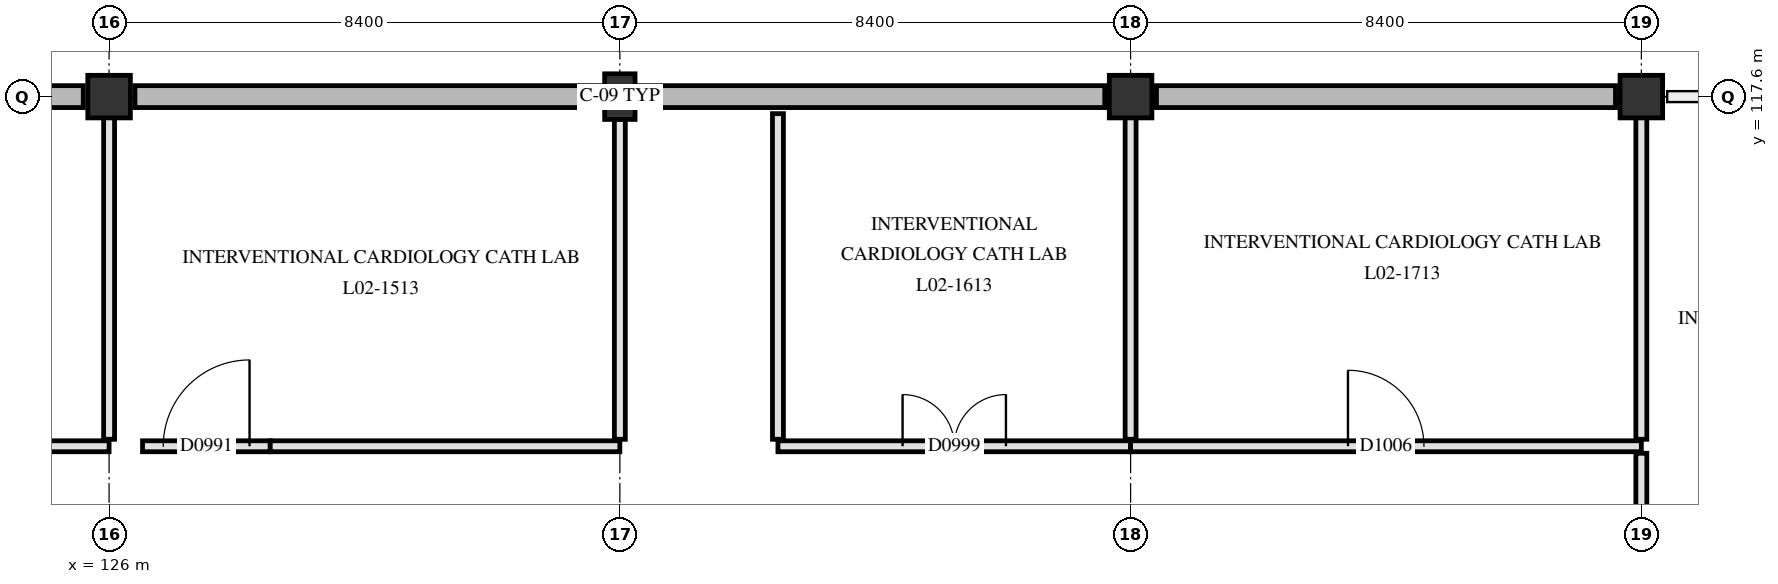
"""IFC4 building model, lengths in metres.
Left out: names, types, materials, properties, quantities, classifications, styles, units other than length and angle.
Written with IfcOpenShell. Run it as: python <this file> out.ifc"""

import sys

from ifc_helpers import new_model, si_unit, direction, frame, frame_2d, origin, origin_2d, place, context, subcontext, project, spatial, rectangle, extrude, element, fill, save


model = new_model("IFC4")
c1 = context("Model", 3, precision=1e-05, world=origin(), true_north=direction((0.0, 1.0)))
c2 = subcontext(c1, "Body", "Model", "MODEL_VIEW")
j1 = project(units=[si_unit("LENGTHUNIT", "METRE"), si_unit("PLANEANGLEUNIT", "RADIAN")], contexts=[c1])
p1 = place(None, origin())
s1 = spatial("IfcSite", under=j1, at=p1, CompositionType="ELEMENT")
p2 = place(p1, origin())
s2 = spatial("IfcBuilding", under=s1, at=p2, CompositionType="ELEMENT")
p3 = place(p2, frame((0.0, 0.0, 9.3)))
s3 = spatial("IfcBuildingStorey", under=s2, at=p3, CompositionType="ELEMENT", Elevation=9.3)
p4 = place(p3, frame((126.0, 117.6, 0.0), z_axis=(0.0, 0.0, 1.0), x_axis=(1.0, 0.0, 0.0)))
e1 = element("IfcColumn", 1, at=p4, inside=s3, PredefinedType="COLUMN", context=c2, shape_type="SweptSolid", body=[
    extrude(rectangle(XDim=0.7, YDim=0.7, at=origin_2d()), origin(), (0.0, 0.0, 1.0), 5.1),
])
p5 = place(p3, frame((134.4, 117.6, 0.0), z_axis=(0.0, 0.0, 1.0), x_axis=(1.0, 0.0, 0.0)))
e2 = element("IfcColumn", 2, at=p5, inside=s3, PredefinedType="PILASTER", context=c2, shape_type="SweptSolid", body=[
    extrude(rectangle(XDim=0.5, YDim=0.75, at=origin_2d()), origin(), (0.0, 0.0, 1.0), 5.1),
])
for number, where, z_axis, x_axis in (
    (3, (142.8, 117.6, 0.0), (0.0, 0.0, 1.0), (1.0, 0.0, 0.0)),
    (4, (151.2, 117.6, 0.0), (0.0, 0.0, 1.0), (1.0, 0.0, 0.0)),
):
    element("IfcColumn", number, at=place(p3, frame(where, z_axis=z_axis, x_axis=x_axis)), inside=s3, PredefinedType="COLUMN", context=c2, shape_type="SweptSolid", body=[
        extrude(rectangle(XDim=0.7, YDim=0.7, at=origin_2d()), origin(), (0.0, 0.0, 1.0), 5.1),
    ])
p6 = place(p3, frame((118.025, 117.6, 0.0), z_axis=(0.0, 0.0, 1.0), x_axis=(1.0, 0.0, 0.0)))
e5 = element("IfcWall", 5, at=p6, inside=s3, PredefinedType="SOLIDWALL", context=c2, shape_type="SweptSolid", body=[
    extrude(rectangle(XDim=7.55, YDim=0.36, at=frame_2d((3.775, 0.0))), origin(), (0.0, 0.0, 1.0), 4.78),
])
for number, where, z_axis, x_axis in (
    (6, (126.425, 117.6, 0.0), (0.0, 0.0, 1.0), (1.0, 0.0, 0.0)),
    (7, (134.725, 117.6, 0.0), (0.0, 0.0, 1.0), (1.0, 0.0, 0.0)),
):
    element("IfcWall", number, at=place(p3, frame(where, z_axis=z_axis, x_axis=x_axis)), inside=s3, PredefinedType="SOLIDWALL", context=c2, shape_type="SweptSolid", body=[
        extrude(rectangle(XDim=7.65, YDim=0.36, at=frame_2d((3.825, 0.0))), origin(), (0.0, 0.0, 1.0), 4.78),
    ])
p7 = place(p3, frame((143.225, 117.6, 0.0), z_axis=(0.0, 0.0, 1.0), x_axis=(1.0, 0.0, 0.0)))
e8 = element("IfcWall", 8, at=p7, inside=s3, PredefinedType="SOLIDWALL", context=c2, shape_type="SweptSolid", body=[
    extrude(rectangle(XDim=7.55, YDim=0.36, at=frame_2d((3.775, 0.0))), origin(), (0.0, 0.0, 1.0), 4.78),
])
p8 = place(p3, frame((117.6, 111.85, 0.0), z_axis=(0.0, 0.0, 1.0), x_axis=(1.0, 0.0, 0.0)))
e9 = element("IfcWall", 9, at=p8, inside=s3, PredefinedType="PARTITIONING", context=c2, shape_type="SweptSolid", body=[
    extrude(rectangle(XDim=8.4, YDim=0.18, at=frame_2d((4.2, 0.0))), origin(), (0.0, 0.0, 1.0), 4.17),
])
p9 = place(p8, frame((3.28, 0.0, 0.0)))
e10 = element("IfcOpeningElement", 10, at=p9, cuts=e9, PredefinedType="OPENING", context=c2, shape_type="SweptSolid", body=[
    extrude(rectangle(XDim=1.84, YDim=2.28, at=frame_2d((0.92, 1.14))), frame((0.0, 0.1, 0.0), z_axis=(0.0, -1.0, 0.0), x_axis=(1.0, 0.0, 0.0)), (0.0, 0.0, 1.0), 0.2),
])
p10 = place(p3, frame((126.55, 111.85, 0.0), z_axis=(0.0, 0.0, 1.0), x_axis=(1.0, 0.0, 0.0)))
e11 = element("IfcWall", 11, at=p10, inside=s3, PredefinedType="PARTITIONING", context=c2, shape_type="SweptSolid", body=[
    extrude(rectangle(XDim=2.1, YDim=0.18, at=frame_2d((1.05, 0.0))), origin(), (0.0, 0.0, 1.0), 4.77),
])
p11 = place(p10, frame((0.34, 0.0, 0.0)))
e12 = element("IfcOpeningElement", 12, at=p11, cuts=e11, PredefinedType="OPENING", context=c2, shape_type="SweptSolid", body=[
    extrude(rectangle(XDim=1.42, YDim=2.22, at=frame_2d((0.71, 1.11))), frame((0.0, 0.1, 0.0), z_axis=(0.0, -1.0, 0.0), x_axis=(1.0, 0.0, 0.0)), (0.0, 0.0, 1.0), 0.2),
])
p12 = place(p3, frame((128.65, 111.85, 0.0), z_axis=(0.0, 0.0, 1.0), x_axis=(1.0, 0.0, 0.0)))
e13 = element("IfcWall", 13, at=p12, inside=s3, PredefinedType="PARTITIONING", context=c2, shape_type="SweptSolid", body=[
    extrude(rectangle(XDim=5.75, YDim=0.18, at=frame_2d((2.875, 0.0))), origin(), (0.0, 0.0, 1.0), 4.17),
])
p13 = place(p3, frame((137.0, 111.85, 0.0), z_axis=(0.0, 0.0, 1.0), x_axis=(1.0, 0.0, 0.0)))
e14 = element("IfcWall", 14, at=p13, inside=s3, PredefinedType="PARTITIONING", context=c2, shape_type="SweptSolid", body=[
    extrude(rectangle(XDim=5.8, YDim=0.18, at=frame_2d((2.9, 0.0))), origin(), (0.0, 0.0, 1.0), 4.17),
])
p14 = place(p13, frame((2.05, 0.0, 0.0)))
e15 = element("IfcOpeningElement", 15, at=p14, cuts=e14, PredefinedType="OPENING", context=c2, shape_type="SweptSolid", body=[
    extrude(rectangle(XDim=1.7, YDim=2.25, at=frame_2d((0.85, 1.125))), frame((0.0, 0.1, 0.0), z_axis=(0.0, -1.0, 0.0), x_axis=(1.0, 0.0, 0.0)), (0.0, 0.0, 1.0), 0.2),
])
p15 = place(p3, frame((142.8, 111.85, 0.0), z_axis=(0.0, 0.0, 1.0), x_axis=(1.0, 0.0, 0.0)))
e16 = element("IfcWall", 16, at=p15, inside=s3, PredefinedType="PARTITIONING", context=c2, shape_type="SweptSolid", body=[
    extrude(rectangle(XDim=8.4, YDim=0.18, at=frame_2d((4.2, 0.0))), origin(), (0.0, 0.0, 1.0), 4.17),
])
p16 = place(p15, frame((3.575, 0.0, 0.0)))
e17 = element("IfcOpeningElement", 17, at=p16, cuts=e16, PredefinedType="OPENING", context=c2, shape_type="SweptSolid", body=[
    extrude(rectangle(XDim=1.25, YDim=2.2, at=frame_2d((0.625, 1.1))), frame((0.0, 0.1, 0.0), z_axis=(0.0, -1.0, 0.0), x_axis=(1.0, 0.0, 0.0)), (0.0, 0.0, 1.0), 0.2),
])
p17 = place(p3, frame((126.0, 111.965, 0.0), z_axis=(0.0, 0.0, 1.0), x_axis=(0.0, 1.0, 0.0)))
e18 = element("IfcWall", 18, at=p17, inside=s3, PredefinedType="PARTITIONING", context=c2, shape_type="SweptSolid", body=[
    extrude(rectangle(XDim=5.29, YDim=0.18, at=frame_2d((2.645, 0.0))), origin(), (0.0, 0.0, 1.0), 4.17),
])
p18 = place(p3, frame((134.4, 111.965, 0.0), z_axis=(0.0, 0.0, 1.0), x_axis=(0.0, 1.0, 0.0)))
e19 = element("IfcWall", 19, at=p18, inside=s3, PredefinedType="PARTITIONING", context=c2, shape_type="SweptSolid", body=[
    extrude(rectangle(XDim=5.265, YDim=0.18, at=frame_2d((2.632, 0.0))), origin(), (0.0, 0.0, 1.0), 4.17),
])
p19 = place(p3, frame((137.0, 111.965, 0.0), z_axis=(0.0, 0.0, 1.0), x_axis=(0.0, 1.0, 0.0)))
e20 = element("IfcWall", 20, at=p19, inside=s3, PredefinedType="PARTITIONING", context=c2, shape_type="SweptSolid", body=[
    extrude(rectangle(XDim=5.355, YDim=0.18, at=frame_2d((2.677, 0.0))), origin(), (0.0, 0.0, 1.0), 4.77),
])
p20 = place(p3, frame((142.8, 111.965, 0.0), z_axis=(0.0, 0.0, 1.0), x_axis=(0.0, 1.0, 0.0)))
e21 = element("IfcWall", 21, at=p20, inside=s3, PredefinedType="PARTITIONING", context=c2, shape_type="SweptSolid", body=[
    extrude(rectangle(XDim=5.29, YDim=0.18, at=frame_2d((2.645, 0.0))), origin(), (0.0, 0.0, 1.0), 4.17),
])
p21 = place(p3, frame((151.2, 109.865, 0.0), z_axis=(0.0, 0.0, 1.0), x_axis=(0.0, 1.0, 0.0)))
e22 = element("IfcWall", 22, at=p21, inside=s3, PredefinedType="PARTITIONING", context=c2, shape_type="SweptSolid", body=[
    extrude(rectangle(XDim=1.87, YDim=0.18, at=frame_2d((0.935, 0.0))), origin(), (0.0, 0.0, 1.0), 4.17),
])
p22 = place(p3, frame((151.2, 111.965, 0.0), z_axis=(0.0, 0.0, 1.0), x_axis=(0.0, 1.0, 0.0)))
e23 = element("IfcWall", 23, at=p22, inside=s3, PredefinedType="PARTITIONING", context=c2, shape_type="SweptSolid", body=[
    extrude(rectangle(XDim=5.29, YDim=0.18, at=frame_2d((2.645, 0.0))), origin(), (0.0, 0.0, 1.0), 4.17),
])
p23 = place(p11, origin())
e24 = element("IfcDoor", 24, at=p23, inside=s3, OperationType="SINGLE_SWING_RIGHT", PredefinedType="DOOR", context=c2, shape_type="SweptSolid", body=[
    extrude(rectangle(XDim=1.42, YDim=2.22, at=frame_2d((0.71, 1.11))), frame((0.0, 0.025, 0.0), z_axis=(0.0, -1.0, 0.0), x_axis=(1.0, 0.0, 0.0)), (0.0, 0.0, 1.0), 0.05),
])
fill(e12, e24)
p24 = place(p14, origin())
e25 = element("IfcDoor", 25, at=p24, inside=s3, OperationType="DOUBLE_SWING_RIGHT", PredefinedType="DOOR", context=c2, shape_type="SweptSolid", body=[
    extrude(rectangle(XDim=1.7, YDim=2.25, at=frame_2d((0.85, 1.125))), frame((0.0, 0.025, 0.0), z_axis=(0.0, -1.0, 0.0), x_axis=(1.0, 0.0, 0.0)), (0.0, 0.0, 1.0), 0.05),
])
fill(e15, e25)
p25 = place(p16, origin())
e26 = element("IfcDoor", 26, at=p25, inside=s3, OperationType="SINGLE_SWING_LEFT", PredefinedType="DOOR", context=c2, shape_type="SweptSolid", body=[
    extrude(rectangle(XDim=1.25, YDim=2.2, at=frame_2d((0.625, 1.1))), frame((0.0, 0.025, 0.0), z_axis=(0.0, -1.0, 0.0), x_axis=(1.0, 0.0, 0.0)), (0.0, 0.0, 1.0), 0.05),
])
fill(e17, e26)
save(model, sys.argv[1])
